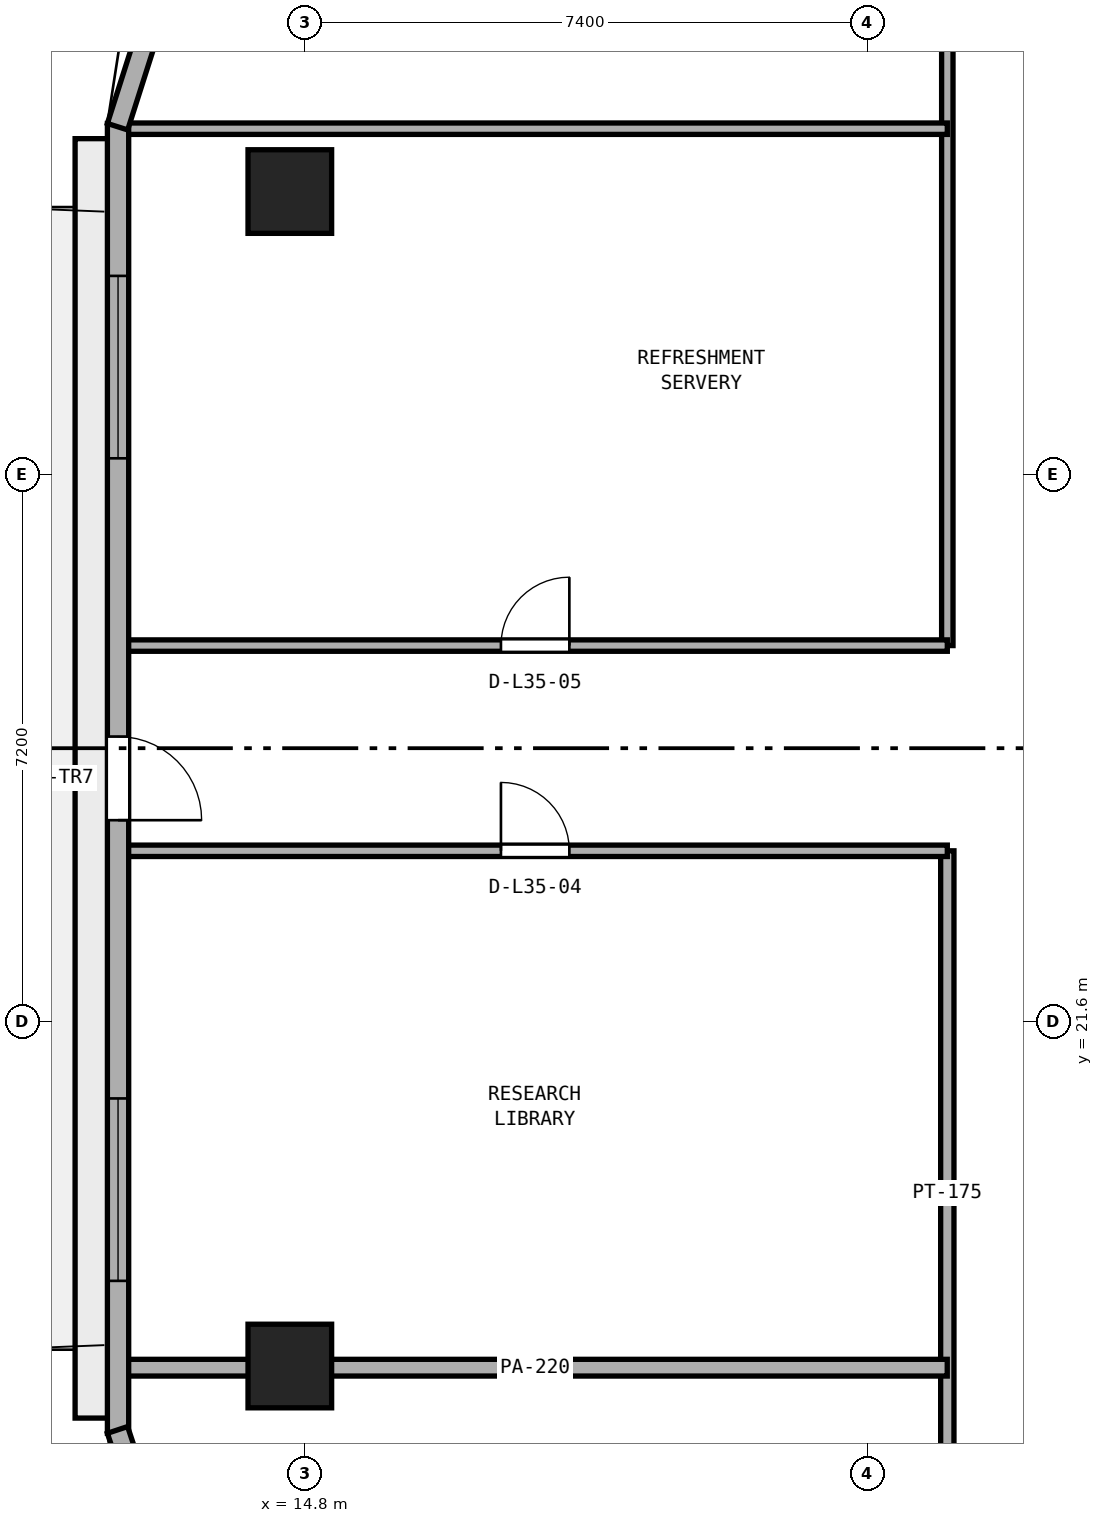
"""IFC4 building model, lengths in metres.
Left out: names, types, materials, properties, quantities, classifications, styles, units other than length and angle.
Written with IfcOpenShell. Run it as: python <this file> out.ifc"""

import sys

from ifc_helpers import new_model, si_unit, direction, frame, frame_2d, origin, origin_2d, place, context, subcontext, project, spatial, rectangle, extrude, element, fill, save


model = new_model("IFC4")
c1 = context("Model", 3, precision=1e-05, world=origin(), true_north=direction((0.0, 1.0)))
c2 = subcontext(c1, "Body", "Model", "MODEL_VIEW")
j1 = project(units=[si_unit("LENGTHUNIT", "METRE"), si_unit("PLANEANGLEUNIT", "RADIAN")], contexts=[c1])
p1 = place(None, origin())
s1 = spatial("IfcSite", under=j1, at=p1, CompositionType="ELEMENT")
p2 = place(p1, origin())
s2 = spatial("IfcBuilding", under=s1, at=p2, CompositionType="ELEMENT")
p3 = place(p2, frame((0.0, 0.0, 140.2)))
s3 = spatial("IfcBuildingStorey", under=s2, at=p3, CompositionType="ELEMENT", Elevation=140.2)
for number, where, z_axis, x_axis in (
    (1, (14.6, 32.523, 0.0), (0.0, 0.0, 1.0), (1.0, 0.0, 0.0)),
    (2, (14.6, 17.072, 0.0), (0.0, 0.0, 1.0), (1.0, 0.0, 0.0)),
):
    element("IfcColumn", number, at=place(p3, frame(where, z_axis=z_axis, x_axis=x_axis)), inside=s3, PredefinedType="COLUMN", context=c2, shape_type="SweptSolid", body=[
        extrude(rectangle(XDim=1.1, YDim=1.1, at=origin_2d()), origin(), (0.0, 0.0, 1.0), 3.8),
    ])
p4 = place(p3, frame((23.25, 14.85, 0.0), z_axis=(0.0, 0.0, 1.0), x_axis=(0.0, 1.0, 0.0)))
e3 = element("IfcWall", 3, at=p4, inside=s3, PredefinedType="PARTITIONING", context=c2, shape_type="SweptSolid", body=[
    extrude(rectangle(XDim=9.0, YDim=0.175, at=frame_2d((4.5, 0.0))), origin(), (0.0, 0.0, 1.0), 3.54),
])
p5 = place(p3, frame((23.25, 26.55, 0.0), z_axis=(0.0, 0.0, 1.0), x_axis=(0.0, 1.0, 0.0)))
e4 = element("IfcWall", 4, at=p5, inside=s3, PredefinedType="PARTITIONING", context=c2, shape_type="SweptSolid", body=[
    extrude(rectangle(XDim=9.0, YDim=0.15, at=frame_2d((4.5, 0.0))), origin(), (0.0, 0.0, 1.0), 3.54),
])
p6 = place(p3, frame((12.405, 17.05, 0.0), z_axis=(0.0, 0.0, 1.0), x_axis=(1.0, 0.0, 0.0)))
e5 = element("IfcWall", 5, at=p6, inside=s3, PredefinedType="PARTITIONING", context=c2, shape_type="SweptSolid", body=[
    extrude(rectangle(XDim=10.844, YDim=0.22, at=frame_2d((5.422, 0.0))), origin(), (0.0, 0.0, 1.0), 2.923),
])
p7 = place(p3, frame((12.405, 23.85, 0.0), z_axis=(0.0, 0.0, 1.0), x_axis=(1.0, 0.0, 0.0)))
e6 = element("IfcWall", 6, at=p7, inside=s3, PredefinedType="PARTITIONING", context=c2, shape_type="SweptSolid", body=[
    extrude(rectangle(XDim=10.845, YDim=0.15, at=frame_2d((5.422, 0.0))), origin(), (0.0, 0.0, 1.0), 3.54),
])
p8 = place(p7, frame((4.972, 0.0, 0.0)))
e7 = element("IfcOpeningElement", 7, at=p8, cuts=e6, PredefinedType="OPENING", context=c2, shape_type="SweptSolid", body=[
    extrude(rectangle(XDim=0.9, YDim=2.1, at=frame_2d((0.45, 1.05))), frame((0.0, 0.085, 0.0), z_axis=(0.0, -1.0, 0.0), x_axis=(1.0, 0.0, 0.0)), (0.0, 0.0, 1.0), 0.17),
])
p9 = place(p3, frame((12.405, 26.55, 0.0), z_axis=(0.0, 0.0, 1.0), x_axis=(1.0, 0.0, 0.0)))
e8 = element("IfcWall", 8, at=p9, inside=s3, PredefinedType="PARTITIONING", context=c2, shape_type="SweptSolid", body=[
    extrude(rectangle(XDim=10.845, YDim=0.15, at=frame_2d((5.422, 0.0))), origin(), (0.0, 0.0, 1.0), 3.54),
])
p10 = place(p9, frame((4.972, 0.0, 0.0)))
e9 = element("IfcOpeningElement", 9, at=p10, cuts=e8, PredefinedType="OPENING", context=c2, shape_type="SweptSolid", body=[
    extrude(rectangle(XDim=0.9, YDim=2.1, at=frame_2d((0.45, 1.05))), frame((0.0, 0.085, 0.0), z_axis=(0.0, -1.0, 0.0), x_axis=(1.0, 0.0, 0.0)), (0.0, 0.0, 1.0), 0.17),
])
p11 = place(p3, frame((12.405, 33.35, 0.0), z_axis=(0.0, 0.0, 1.0), x_axis=(1.0, 0.0, 0.0)))
e10 = element("IfcWall", 10, at=p11, inside=s3, PredefinedType="PARTITIONING", context=c2, shape_type="SweptSolid", body=[
    extrude(rectangle(XDim=10.845, YDim=0.15, at=frame_2d((5.422, 0.0))), origin(), (0.0, 0.0, 1.0), 3.54),
])
p12 = place(p3, frame((12.34, 33.419, 0.0), z_axis=(0.0, 0.0, 1.0), x_axis=(0.0, -1.0, 0.0)))
e11 = element("IfcWall", 11, at=p12, inside=s3, PredefinedType="STANDARD", context=c2, shape_type="SweptSolid", body=[
    extrude(rectangle(XDim=17.232, YDim=0.28, at=frame_2d((8.616, 0.0))), origin(), (0.0, 0.0, 1.0), 3.54),
])
p13 = place(p12, frame((8.066, 0.0, 0.0)))
e12 = element("IfcOpeningElement", 12, at=p13, cuts=e11, PredefinedType="OPENING", context=c2, shape_type="SweptSolid", body=[
    extrude(rectangle(XDim=1.1, YDim=2.2, at=frame_2d((0.55, 1.1))), frame((0.0, 0.15, 0.0), z_axis=(0.0, -1.0, 0.0), x_axis=(1.0, 0.0, 0.0)), (0.0, 0.0, 1.0), 0.3),
])
p14 = place(p12, frame((2.005, 0.0, 0.9)))
e13 = element("IfcOpeningElement", 13, at=p14, cuts=e11, PredefinedType="OPENING", context=c2, shape_type="SweptSolid", body=[
    extrude(rectangle(XDim=2.4, YDim=1.75, at=frame_2d((1.2, 0.875))), frame((0.0, 0.15, 0.0), z_axis=(0.0, -1.0, 0.0), x_axis=(1.0, 0.0, 0.0)), (0.0, 0.0, 1.0), 0.3),
])
p15 = place(p12, frame((12.827, 0.0, 0.9)))
e14 = element("IfcOpeningElement", 14, at=p15, cuts=e11, PredefinedType="OPENING", context=c2, shape_type="SweptSolid", body=[
    extrude(rectangle(XDim=2.4, YDim=1.75, at=frame_2d((1.2, 0.875))), frame((0.0, 0.15, 0.0), z_axis=(0.0, -1.0, 0.0), x_axis=(1.0, 0.0, 0.0)), (0.0, 0.0, 1.0), 0.3),
])
p16 = place(p3, frame((13.053, 35.634, 0.0), z_axis=(0.0, 0.0, 1.0), x_axis=(-0.303807416298, -0.952733464198, 0.0)))
e15 = element("IfcWall", 15, at=p16, inside=s3, PredefinedType="STANDARD", context=c2, shape_type="SweptSolid", body=[
    extrude(rectangle(XDim=2.37, YDim=0.28, at=frame_2d((1.185, 0.0))), origin(), (0.0, 0.0, 1.0), 3.54),
])
p17 = place(p3, frame((12.333, 16.231, 0.0), z_axis=(0.0, 0.0, 1.0), x_axis=(0.315364302967, -0.94897068259, 0.0)))
e16 = element("IfcWall", 16, at=p17, inside=s3, PredefinedType="STANDARD", context=c2, shape_type="SweptSolid", body=[
    extrude(rectangle(XDim=2.46, YDim=0.28, at=frame_2d((1.23, 0.0))), origin(), (0.0, 0.0, 1.0), 3.54),
])
p18 = place(p8, origin())
e17 = element("IfcDoor", 17, at=p18, inside=s3, OperationType="SINGLE_SWING_LEFT", PredefinedType="DOOR", context=c2, shape_type="SweptSolid", body=[
    extrude(rectangle(XDim=0.9, YDim=2.1, at=frame_2d((0.45, 1.05))), frame((0.0, 0.025, 0.0), z_axis=(0.0, -1.0, 0.0), x_axis=(1.0, 0.0, 0.0)), (0.0, 0.0, 1.0), 0.05),
])
fill(e7, e17)
p19 = place(p10, origin())
e18 = element("IfcDoor", 18, at=p19, inside=s3, OperationType="SINGLE_SWING_RIGHT", PredefinedType="DOOR", context=c2, shape_type="SweptSolid", body=[
    extrude(rectangle(XDim=0.9, YDim=2.1, at=frame_2d((0.45, 1.05))), frame((0.0, 0.025, 0.0), z_axis=(0.0, -1.0, 0.0), x_axis=(1.0, 0.0, 0.0)), (0.0, 0.0, 1.0), 0.05),
])
fill(e9, e18)
p20 = place(p13, origin())
e19 = element("IfcDoor", 19, at=p20, inside=s3, OperationType="SINGLE_SWING_RIGHT", PredefinedType="DOOR", context=c2, shape_type="SweptSolid", body=[
    extrude(rectangle(XDim=1.1, YDim=2.2, at=frame_2d((0.55, 1.1))), frame((0.0, 0.025, 0.0), z_axis=(0.0, -1.0, 0.0), x_axis=(1.0, 0.0, 0.0)), (0.0, 0.0, 1.0), 0.05),
])
fill(e12, e19)
p21 = place(p14, origin())
e20 = element("IfcWindow", 20, at=p21, inside=s3, PartitioningType="SINGLE_PANEL", PredefinedType="WINDOW", context=c2, shape_type="SweptSolid", body=[
    extrude(rectangle(XDim=2.4, YDim=1.75, at=frame_2d((1.2, 0.875))), frame((0.0, 0.03, 0.0), z_axis=(0.0, -1.0, 0.0), x_axis=(1.0, 0.0, 0.0)), (0.0, 0.0, 1.0), 0.06),
])
fill(e13, e20)
p22 = place(p15, origin())
e21 = element("IfcWindow", 21, at=p22, inside=s3, PartitioningType="SINGLE_PANEL", PredefinedType="WINDOW", context=c2, shape_type="SweptSolid", body=[
    extrude(rectangle(XDim=2.4, YDim=1.75, at=frame_2d((1.2, 0.875))), frame((0.0, 0.03, 0.0), z_axis=(0.0, -1.0, 0.0), x_axis=(1.0, 0.0, 0.0)), (0.0, 0.0, 1.0), 0.06),
])
fill(e14, e21)
save(model, sys.argv[1])
